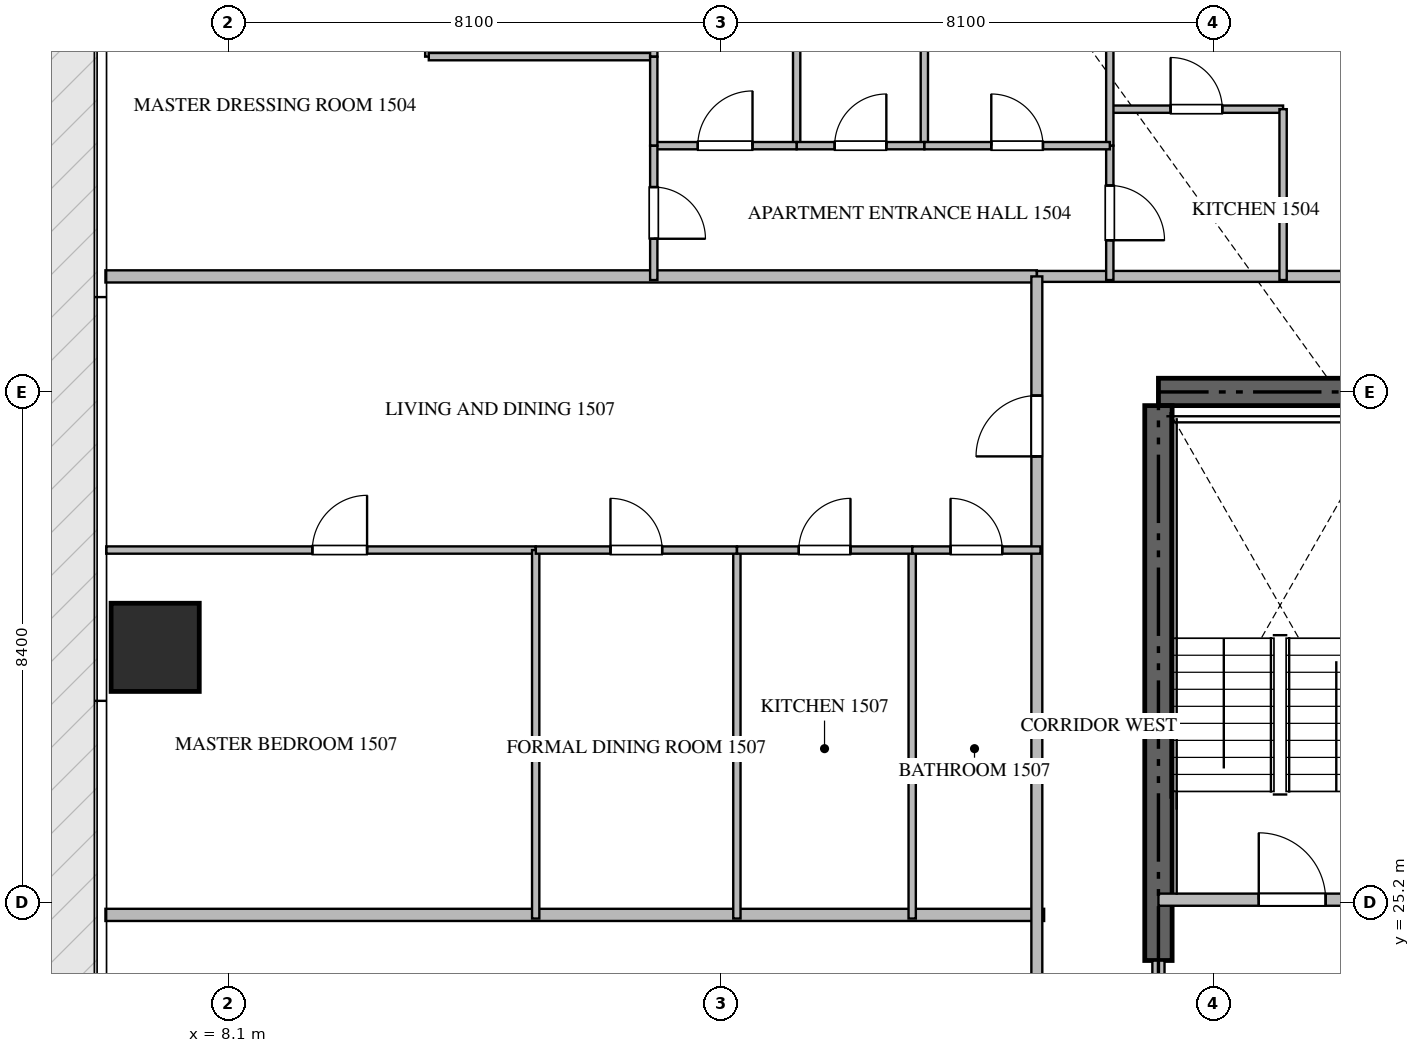
"""IFC4 building model, lengths in metres.
Left out: names, types, materials, properties, quantities, classifications, styles, units other than length and angle.
Written with IfcOpenShell. Run it as: python <this file> out.ifc"""

import sys

from ifc_helpers import new_model, si_unit, direction, frame, frame_2d, origin, origin_2d, place, context, subcontext, project, spatial, rectangle, extrude, source, transform, mapped, element, fill, save


model = new_model("IFC4")
c1 = context("Model", 3, precision=1e-05, world=origin(), true_north=direction((0.0, 1.0)))
c2 = subcontext(c1, "Body", "Model", "MODEL_VIEW")
j1 = project(units=[si_unit("LENGTHUNIT", "METRE"), si_unit("PLANEANGLEUNIT", "RADIAN")], contexts=[c1])
p1 = place(None, origin())
s1 = spatial("IfcSite", under=j1, at=p1, CompositionType="ELEMENT")
p2 = place(p1, origin())
s2 = spatial("IfcBuilding", under=s1, at=p2, CompositionType="ELEMENT")
p3 = place(p2, frame((0.0, 0.0, 64.2)))
s3 = spatial("IfcBuildingStorey", under=s2, at=p3, CompositionType="ELEMENT", Elevation=64.2)
p4 = place(p3, frame((41.4, 33.6, -0.26), z_axis=(0.0, 0.0, 1.0), x_axis=(-1.0, 0.0, 0.0)))
e1 = element("IfcWall", 1, at=p4, inside=s3, PredefinedType="SHEAR", context=c2, shape_type="SweptSolid", body=[
    extrude(rectangle(XDim=18.0, YDim=0.45, at=frame_2d((9.0, 0.0))), origin(), (0.0, 0.0, 1.0), 3.748),
])
p5 = place(p3, frame((23.4, 24.25, -0.26), z_axis=(0.0, 0.0, 1.0), x_axis=(0.0, 1.0, 0.0)))
e2 = element("IfcWall", 2, at=p5, inside=s3, PredefinedType="SHEAR", context=c2, shape_type="SweptSolid", body=[
    extrude(rectangle(XDim=9.125, YDim=0.45, at=frame_2d((4.562, 0.0))), origin(), (0.0, 0.0, 1.0), 3.748),
])
m1 = source(origin(), c2, "Body", "SweptSolid", [
    extrude(rectangle(XDim=1.45, YDim=1.45, at=origin_2d()), origin(), (0.0, 0.0, 1.0), 3.75),
])
p6 = place(p3, frame((6.9, 29.4, -0.26), z_axis=(0.0, 0.0, 1.0), x_axis=(1.0, 0.0, 0.0)))
e3 = element("IfcColumn", 3, at=p6, inside=s3, PredefinedType="COLUMN", context=c2, shape_type="MappedRepresentation", body=[
    mapped(m1, transform((0.0, 0.0, 0.0), scale=1.0)),
])
p7 = place(p3, frame((23.4, 25.25, 0.0), z_axis=(0.0, 0.0, 1.0), x_axis=(1.0, 0.0, 0.0)))
e4 = element("IfcWall", 4, at=p7, inside=s3, PredefinedType="STANDARD", context=c2, shape_type="SweptSolid", body=[
    extrude(rectangle(XDim=4.45, YDim=0.2, at=frame_2d((2.225, 0.0))), origin(), (0.0, 0.0, 1.0), 3.49),
])
p8 = place(p7, frame((1.65, 0.0, 0.0)))
e5 = element("IfcOpeningElement", 5, at=p8, cuts=e4, PredefinedType="OPENING", context=c2, shape_type="SweptSolid", body=[
    extrude(rectangle(XDim=1.1, YDim=2.15, at=frame_2d((0.55, 1.075))), frame((0.0, 0.11, 0.0), z_axis=(0.0, -1.0, 0.0), x_axis=(1.0, 0.0, 0.0)), (0.0, 0.0, 1.0), 0.22),
])
p9 = place(p3, frame((23.4, 21.852, 0.0), z_axis=(0.0, 0.0, 1.0), x_axis=(0.0, 1.0, 0.0)))
e6 = element("IfcWall", 6, at=p9, inside=s3, PredefinedType="STANDARD", context=c2, shape_type="SweptSolid", body=[
    extrude(rectangle(XDim=2.396, YDim=0.2, at=frame_2d((1.198, 0.0))), origin(), (0.0, 0.0, 1.0), 3.49),
])
p10 = place(p9, frame((0.648, 0.0, 0.0)))
e7 = element("IfcOpeningElement", 7, at=p10, cuts=e6, PredefinedType="OPENING", context=c2, shape_type="SweptSolid", body=[
    extrude(rectangle(XDim=1.1, YDim=2.15, at=frame_2d((0.55, 1.075))), frame((0.0, 0.11, 0.0), z_axis=(0.0, -1.0, 0.0), x_axis=(1.0, 0.0, 0.0)), (0.0, 0.0, 1.0), 0.22),
])
p11 = place(p3, frame((6.082, 25.0, 0.0), z_axis=(0.0, 0.0, 1.0), x_axis=(1.0, 0.0, 0.0)))
e8 = element("IfcWall", 8, at=p11, inside=s3, PredefinedType="PARTITIONING", context=c2, shape_type="SweptSolid", body=[
    extrude(rectangle(XDim=15.438, YDim=0.2, at=frame_2d((7.719, 0.0))), origin(), (0.0, 0.0, 1.0), 3.49),
])
p12 = place(p3, frame((6.082, 35.5, 0.0), z_axis=(0.0, 0.0, 1.0), x_axis=(1.0, 0.0, 0.0)))
e9 = element("IfcWall", 9, at=p12, inside=s3, PredefinedType="PARTITIONING", context=c2, shape_type="SweptSolid", body=[
    extrude(rectangle(XDim=15.318, YDim=0.2, at=frame_2d((7.659, 0.0))), origin(), (0.0, 0.0, 1.0), 3.49),
])
p13 = place(p3, frame((21.402, 35.5, 0.0), z_axis=(0.0, 0.0, 1.0), x_axis=(1.0, 0.0, 0.0)))
e10 = element("IfcWall", 10, at=p13, inside=s3, PredefinedType="PARTITIONING", context=c2, shape_type="SweptSolid", body=[
    extrude(rectangle(XDim=21.996, YDim=0.18, at=frame_2d((10.998, 0.0))), origin(), (0.0, 0.0, 1.0), 3.49),
])
p14 = place(p13, frame((6.425, 0.0, 0.0)))
e11 = element("IfcOpeningElement", 11, at=p14, cuts=e10, PredefinedType="OPENING", context=c2, shape_type="SweptSolid", body=[
    extrude(rectangle(XDim=1.0, YDim=2.15, at=frame_2d((0.5, 1.075))), frame((0.0, 0.1, 0.0), z_axis=(0.0, -1.0, 0.0), x_axis=(1.0, 0.0, 0.0)), (0.0, 0.0, 1.0), 0.2),
])
p15 = place(p13, frame((13.605, 0.0, 0.0)))
e12 = element("IfcOpeningElement", 12, at=p15, cuts=e10, PredefinedType="OPENING", context=c2, shape_type="SweptSolid", body=[
    extrude(rectangle(XDim=1.0, YDim=2.15, at=frame_2d((0.5, 1.075))), frame((0.0, 0.1, 0.0), z_axis=(0.0, -1.0, 0.0), x_axis=(1.0, 0.0, 0.0)), (0.0, 0.0, 1.0), 0.2),
])
p16 = place(p3, frame((21.4, 14.9, 0.0), z_axis=(0.0, 0.0, 1.0), x_axis=(0.0, 1.0, 0.0)))
e13 = element("IfcWall", 13, at=p16, inside=s3, PredefinedType="PARTITIONING", context=c2, shape_type="SweptSolid", body=[
    extrude(rectangle(XDim=20.6, YDim=0.18, at=frame_2d((10.3, 0.0))), origin(), (0.0, 0.0, 1.0), 3.49),
])
p17 = place(p16, frame((5.919, 0.0, 0.0)))
e14 = element("IfcOpeningElement", 14, at=p17, cuts=e13, PredefinedType="OPENING", context=c2, shape_type="SweptSolid", body=[
    extrude(rectangle(XDim=1.0, YDim=2.15, at=frame_2d((0.5, 1.075))), frame((0.0, 0.1, 0.0), z_axis=(0.0, -1.0, 0.0), x_axis=(1.0, 0.0, 0.0)), (0.0, 0.0, 1.0), 0.2),
])
p18 = place(p16, frame((17.64, 0.0, 0.0)))
e15 = element("IfcOpeningElement", 15, at=p18, cuts=e13, PredefinedType="OPENING", context=c2, shape_type="SweptSolid", body=[
    extrude(rectangle(XDim=1.0, YDim=2.15, at=frame_2d((0.5, 1.075))), frame((0.0, 0.1, 0.0), z_axis=(0.0, -1.0, 0.0), x_axis=(1.0, 0.0, 0.0)), (0.0, 0.0, 1.0), 0.2),
])
p19 = place(p3, frame((22.6, 38.25, 0.0), z_axis=(0.0, 0.0, 1.0), x_axis=(1.0, 0.0, 0.0)))
e16 = element("IfcWall", 16, at=p19, inside=s3, PredefinedType="PARTITIONING", context=c2, shape_type="SweptSolid", body=[
    extrude(rectangle(XDim=2.85, YDim=0.12, at=frame_2d((1.425, 0.0))), origin(), (0.0, 0.0, 1.0), 3.49),
])
p20 = place(p19, frame((1.0, 0.0, 0.0)))
e17 = element("IfcOpeningElement", 17, at=p20, cuts=e16, PredefinedType="OPENING", context=c2, shape_type="SweptSolid", body=[
    extrude(rectangle(XDim=0.85, YDim=2.1, at=frame_2d((0.425, 1.05))), frame((0.0, 0.07, 0.0), z_axis=(0.0, -1.0, 0.0), x_axis=(1.0, 0.0, 0.0)), (0.0, 0.0, 1.0), 0.14),
])
p21 = place(p3, frame((25.45, 38.25, 0.0), z_axis=(0.0, 0.0, 1.0), x_axis=(0.0, -1.0, 0.0)))
e18 = element("IfcWall", 18, at=p21, inside=s3, PredefinedType="PARTITIONING", context=c2, shape_type="SweptSolid", body=[
    extrude(rectangle(XDim=2.81, YDim=0.12, at=frame_2d((1.405, 0.0))), origin(), (0.0, 0.0, 1.0), 3.49),
])
p22 = place(p3, frame((22.6, 37.65, 0.0), z_axis=(0.0, 0.0, 1.0), x_axis=(0.0, -1.0, 0.0)))
e19 = element("IfcWall", 19, at=p22, inside=s3, PredefinedType="PARTITIONING", context=c2, shape_type="SweptSolid", body=[
    extrude(rectangle(XDim=2.21, YDim=0.12, at=frame_2d((1.105, 0.0))), origin(), (0.0, 0.0, 1.0), 3.49),
])
p23 = place(p22, frame((0.655, 0.0, 0.0)))
e20 = element("IfcOpeningElement", 20, at=p23, cuts=e19, PredefinedType="OPENING", context=c2, shape_type="SweptSolid", body=[
    extrude(rectangle(XDim=0.9, YDim=2.1, at=frame_2d((0.45, 1.05))), frame((0.0, 0.07, 0.0), z_axis=(0.0, -1.0, 0.0), x_axis=(1.0, 0.0, 0.0)), (0.0, 0.0, 1.0), 0.14),
])
p24 = place(p3, frame((22.6, 43.538, 0.0), z_axis=(0.0, 0.0, 1.0), x_axis=(0.0, -1.0, 0.0)))
e21 = element("IfcWall", 21, at=p24, inside=s3, PredefinedType="PARTITIONING", context=c2, shape_type="SweptSolid", body=[
    extrude(rectangle(XDim=5.886, YDim=0.12, at=frame_2d((2.943, 0.0))), origin(), (0.0, 0.0, 1.0), 3.49),
])
p25 = place(p3, frame((17.45, 50.105, 0.0), z_axis=(0.0, 0.0, 1.0), x_axis=(0.0, -1.0, 0.0)))
e22 = element("IfcWall", 22, at=p25, inside=s3, PredefinedType="PARTITIONING", context=c2, shape_type="SweptSolid", body=[
    extrude(rectangle(XDim=12.455, YDim=0.12, at=frame_2d((6.228, 0.0))), origin(), (0.0, 0.0, 1.0), 3.49),
])
p26 = place(p3, frame((19.55, 43.54, 0.0), z_axis=(0.0, 0.0, 1.0), x_axis=(0.0, -1.0, 0.0)))
e23 = element("IfcWall", 23, at=p26, inside=s3, PredefinedType="PARTITIONING", context=c2, shape_type="SweptSolid", body=[
    extrude(rectangle(XDim=5.89, YDim=0.12, at=frame_2d((2.945, 0.0))), origin(), (0.0, 0.0, 1.0), 3.49),
])
p27 = place(p3, frame((17.45, 37.65, 0.0), z_axis=(0.0, 0.0, 1.0), x_axis=(1.0, 0.0, 0.0)))
e24 = element("IfcWall", 24, at=p27, inside=s3, PredefinedType="PARTITIONING", context=c2, shape_type="SweptSolid", body=[
    extrude(rectangle(XDim=2.1, YDim=0.12, at=frame_2d((1.05, 0.0))), origin(), (0.0, 0.0, 1.0), 3.49),
])
p28 = place(p27, frame((0.625, 0.0, 0.0)))
e25 = element("IfcOpeningElement", 25, at=p28, cuts=e24, PredefinedType="OPENING", context=c2, shape_type="SweptSolid", body=[
    extrude(rectangle(XDim=0.85, YDim=2.1, at=frame_2d((0.425, 1.05))), frame((0.0, 0.07, 0.0), z_axis=(0.0, -1.0, 0.0), x_axis=(1.0, 0.0, 0.0)), (0.0, 0.0, 1.0), 0.14),
])
p29 = place(p3, frame((19.552, 37.65, 0.0), z_axis=(0.0, 0.0, 1.0), x_axis=(1.0, 0.0, 0.0)))
e26 = element("IfcWall", 26, at=p29, inside=s3, PredefinedType="PARTITIONING", context=c2, shape_type="SweptSolid", body=[
    extrude(rectangle(XDim=3.048, YDim=0.12, at=frame_2d((1.524, 0.0))), origin(), (0.0, 0.0, 1.0), 3.49),
])
p30 = place(p29, frame((1.099, 0.0, 0.0)))
e27 = element("IfcOpeningElement", 27, at=p30, cuts=e26, PredefinedType="OPENING", context=c2, shape_type="SweptSolid", body=[
    extrude(rectangle(XDim=0.85, YDim=2.1, at=frame_2d((0.425, 1.05))), frame((0.0, 0.07, 0.0), z_axis=(0.0, -1.0, 0.0), x_axis=(1.0, 0.0, 0.0)), (0.0, 0.0, 1.0), 0.14),
])
p31 = place(p3, frame((15.1, 37.65, 0.0), z_axis=(0.0, 0.0, 1.0), x_axis=(1.0, 0.0, 0.0)))
e28 = element("IfcWall", 28, at=p31, inside=s3, PredefinedType="PARTITIONING", context=c2, shape_type="SweptSolid", body=[
    extrude(rectangle(XDim=2.348, YDim=0.12, at=frame_2d((1.174, 0.0))), origin(), (0.0, 0.0, 1.0), 3.49),
])
p32 = place(p31, frame((0.724, 0.0, 0.0)))
e29 = element("IfcOpeningElement", 29, at=p32, cuts=e28, PredefinedType="OPENING", context=c2, shape_type="SweptSolid", body=[
    extrude(rectangle(XDim=0.9, YDim=2.1, at=frame_2d((0.45, 1.05))), frame((0.0, 0.07, 0.0), z_axis=(0.0, -1.0, 0.0), x_axis=(1.0, 0.0, 0.0)), (0.0, 0.0, 1.0), 0.14),
])
p33 = place(p3, frame((11.4, 45.905, 0.0), z_axis=(0.0, 0.0, 1.0), x_axis=(0.0, -1.0, 0.0)))
e30 = element("IfcWall", 30, at=p33, inside=s3, PredefinedType="PARTITIONING", context=c2, shape_type="SweptSolid", body=[
    extrude(rectangle(XDim=6.791, YDim=0.12, at=frame_2d((3.396, 0.0))), origin(), (0.0, 0.0, 1.0), 3.49),
])
p34 = place(p3, frame((11.4, 39.114, 0.0), z_axis=(0.0, 0.0, 1.0), x_axis=(1.0, 0.0, 0.0)))
e31 = element("IfcWall", 31, at=p34, inside=s3, PredefinedType="PARTITIONING", context=c2, shape_type="SweptSolid", body=[
    extrude(rectangle(XDim=3.7, YDim=0.12, at=frame_2d((1.85, 0.0))), origin(), (0.0, 0.0, 1.0), 3.49),
])
p35 = place(p3, frame((15.1, 42.898, 0.0), z_axis=(0.0, 0.0, 1.0), x_axis=(0.0, -1.0, 0.0)))
e32 = element("IfcWall", 32, at=p35, inside=s3, PredefinedType="PARTITIONING", context=c2, shape_type="SweptSolid", body=[
    extrude(rectangle(XDim=3.784, YDim=0.12, at=frame_2d((1.892, 0.0))), origin(), (0.0, 0.0, 1.0), 2.922),
])
p36 = place(p35, frame((1.467, 0.0, 0.0)))
e33 = element("IfcOpeningElement", 33, at=p36, cuts=e32, PredefinedType="OPENING", context=c2, shape_type="SweptSolid", body=[
    extrude(rectangle(XDim=0.85, YDim=2.1, at=frame_2d((0.425, 1.05))), frame((0.0, 0.07, 0.0), z_axis=(0.0, -1.0, 0.0), x_axis=(1.0, 0.0, 0.0)), (0.0, 0.0, 1.0), 0.14),
])
p37 = place(p3, frame((15.1, 39.112, 0.0), z_axis=(0.0, 0.0, 1.0), x_axis=(0.0, -1.0, 0.0)))
e34 = element("IfcWall", 34, at=p37, inside=s3, PredefinedType="PARTITIONING", context=c2, shape_type="SweptSolid", body=[
    extrude(rectangle(XDim=1.462, YDim=0.12, at=frame_2d((0.731, 0.0))), origin(), (0.0, 0.0, 1.0), 2.922),
])
p38 = place(p3, frame((15.1, 37.648, 0.0), z_axis=(0.0, 0.0, 1.0), x_axis=(0.0, -1.0, 0.0)))
e35 = element("IfcWall", 35, at=p38, inside=s3, PredefinedType="PARTITIONING", context=c2, shape_type="SweptSolid", body=[
    extrude(rectangle(XDim=2.208, YDim=0.12, at=frame_2d((1.104, 0.0))), origin(), (0.0, 0.0, 1.0), 2.922),
])
p39 = place(p38, frame((0.679, 0.0, 0.0)))
e36 = element("IfcOpeningElement", 36, at=p39, cuts=e35, PredefinedType="OPENING", context=c2, shape_type="SweptSolid", body=[
    extrude(rectangle(XDim=0.85, YDim=2.1, at=frame_2d((0.425, 1.05))), frame((0.0, 0.07, 0.0), z_axis=(0.0, -1.0, 0.0), x_axis=(1.0, 0.0, 0.0)), (0.0, 0.0, 1.0), 0.14),
])
p40 = place(p3, frame((6.095, 31.0, 0.0), z_axis=(0.0, 0.0, 1.0), x_axis=(1.0, 0.0, 0.0)))
e37 = element("IfcWall", 37, at=p40, inside=s3, PredefinedType="PARTITIONING", context=c2, shape_type="SweptSolid", body=[
    extrude(rectangle(XDim=7.063, YDim=0.12, at=frame_2d((3.531, 0.0))), origin(), (0.0, 0.0, 1.0), 3.49),
])
p41 = place(p40, frame((3.39, 0.0, 0.0)))
e38 = element("IfcOpeningElement", 38, at=p41, cuts=e37, PredefinedType="OPENING", context=c2, shape_type="SweptSolid", body=[
    extrude(rectangle(XDim=0.9, YDim=2.1, at=frame_2d((0.45, 1.05))), frame((0.0, 0.07, 0.0), z_axis=(0.0, -1.0, 0.0), x_axis=(1.0, 0.0, 0.0)), (0.0, 0.0, 1.0), 0.14),
])
for number, where, z_axis, x_axis in (
    (39, (13.158, 24.94, 0.0), (0.0, 0.0, 1.0), (0.0, 1.0, 0.0)),
    (40, (16.467, 24.94, 0.0), (0.0, 0.0, 1.0), (0.0, 1.0, 0.0)),
    (41, (19.35, 24.94, 0.0), (0.0, 0.0, 1.0), (0.0, 1.0, 0.0)),
):
    element("IfcWall", number, at=place(p3, frame(where, z_axis=z_axis, x_axis=x_axis)), inside=s3, PredefinedType="PARTITIONING", context=c2, shape_type="SweptSolid", body=[
        extrude(rectangle(XDim=6.06, YDim=0.12, at=frame_2d((3.03, 0.0))), origin(), (0.0, 0.0, 1.0), 3.49),
    ])
p42 = place(p3, frame((13.16, 31.0, 0.0), z_axis=(0.0, 0.0, 1.0), x_axis=(1.0, 0.0, 0.0)))
e42 = element("IfcWall", 42, at=p42, inside=s3, PredefinedType="PARTITIONING", context=c2, shape_type="SweptSolid", body=[
    extrude(rectangle(XDim=3.307, YDim=0.12, at=frame_2d((1.654, 0.0))), origin(), (0.0, 0.0, 1.0), 3.49),
])
p43 = place(p42, frame((1.228, 0.0, 0.0)))
e43 = element("IfcOpeningElement", 43, at=p43, cuts=e42, PredefinedType="OPENING", context=c2, shape_type="SweptSolid", body=[
    extrude(rectangle(XDim=0.85, YDim=2.1, at=frame_2d((0.425, 1.05))), frame((0.0, 0.07, 0.0), z_axis=(0.0, -1.0, 0.0), x_axis=(1.0, 0.0, 0.0)), (0.0, 0.0, 1.0), 0.14),
])
p44 = place(p3, frame((16.469, 31.0, 0.0), z_axis=(0.0, 0.0, 1.0), x_axis=(1.0, 0.0, 0.0)))
e44 = element("IfcWall", 44, at=p44, inside=s3, PredefinedType="PARTITIONING", context=c2, shape_type="SweptSolid", body=[
    extrude(rectangle(XDim=2.881, YDim=0.12, at=frame_2d((1.44, 0.0))), origin(), (0.0, 0.0, 1.0), 3.49),
])
p45 = place(p44, frame((1.016, 0.0, 0.0)))
e45 = element("IfcOpeningElement", 45, at=p45, cuts=e44, PredefinedType="OPENING", context=c2, shape_type="SweptSolid", body=[
    extrude(rectangle(XDim=0.85, YDim=2.1, at=frame_2d((0.425, 1.05))), frame((0.0, 0.07, 0.0), z_axis=(0.0, -1.0, 0.0), x_axis=(1.0, 0.0, 0.0)), (0.0, 0.0, 1.0), 0.14),
])
p46 = place(p3, frame((19.352, 31.0, 0.0), z_axis=(0.0, 0.0, 1.0), x_axis=(1.0, 0.0, 0.0)))
e46 = element("IfcWall", 46, at=p46, inside=s3, PredefinedType="PARTITIONING", context=c2, shape_type="SweptSolid", body=[
    extrude(rectangle(XDim=2.108, YDim=0.12, at=frame_2d((1.054, 0.0))), origin(), (0.0, 0.0, 1.0), 3.49),
])
p47 = place(p46, frame((0.629, 0.0, 0.0)))
e47 = element("IfcOpeningElement", 47, at=p47, cuts=e46, PredefinedType="OPENING", context=c2, shape_type="SweptSolid", body=[
    extrude(rectangle(XDim=0.85, YDim=2.1, at=frame_2d((0.425, 1.05))), frame((0.0, 0.07, 0.0), z_axis=(0.0, -1.0, 0.0), x_axis=(1.0, 0.0, 0.0)), (0.0, 0.0, 1.0), 0.14),
])
m2 = source(origin(), c2, "Body", "SweptSolid", [
    extrude(rectangle(XDim=1.1, YDim=2.15, at=frame_2d((0.55, 1.075))), frame((0.0, 0.025, 0.0), z_axis=(0.0, -1.0, 0.0), x_axis=(1.0, 0.0, 0.0)), (0.0, 0.0, 1.0), 0.05),
])
p48 = place(p8, origin())
e48 = element("IfcDoor", 48, at=p48, inside=s3, OperationType="SINGLE_SWING_LEFT", PredefinedType="DOOR", context=c2, shape_type="MappedRepresentation", body=[
    mapped(m2, transform((0.0, 0.0, 0.0), scale=1.0)),
])
fill(e5, e48)
m3 = source(origin(), c2, "Body", "SweptSolid", [
    extrude(rectangle(XDim=1.0, YDim=2.15, at=frame_2d((0.5, 1.075))), frame((0.0, 0.025, 0.0), z_axis=(0.0, -1.0, 0.0), x_axis=(1.0, 0.0, 0.0)), (0.0, 0.0, 1.0), 0.05),
])
p49 = place(p18, origin())
e49 = element("IfcDoor", 49, at=p49, inside=s3, OperationType="SINGLE_SWING_LEFT", PredefinedType="DOOR", context=c2, shape_type="MappedRepresentation", body=[
    mapped(m3, transform((0.0, 0.0, 0.0), scale=1.0)),
])
fill(e15, e49)
m4 = source(origin(), c2, "Body", "SweptSolid", [
    extrude(rectangle(XDim=0.85, YDim=2.1, at=frame_2d((0.425, 1.05))), frame((0.0, 0.025, 0.0), z_axis=(0.0, -1.0, 0.0), x_axis=(1.0, 0.0, 0.0)), (0.0, 0.0, 1.0), 0.05),
])
p50 = place(p20, origin())
e50 = element("IfcDoor", 50, at=p50, inside=s3, OperationType="SINGLE_SWING_LEFT", PredefinedType="DOOR", context=c2, shape_type="MappedRepresentation", body=[
    mapped(m4, transform((0.0, 0.0, 0.0), scale=1.0)),
])
fill(e17, e50)
m5 = source(origin(), c2, "Body", "SweptSolid", [
    extrude(rectangle(XDim=0.9, YDim=2.1, at=frame_2d((0.45, 1.05))), frame((0.0, 0.025, 0.0), z_axis=(0.0, -1.0, 0.0), x_axis=(1.0, 0.0, 0.0)), (0.0, 0.0, 1.0), 0.05),
])
p51 = place(p23, origin())
e51 = element("IfcDoor", 51, at=p51, inside=s3, OperationType="SINGLE_SWING_RIGHT", PredefinedType="DOOR", context=c2, shape_type="MappedRepresentation", body=[
    mapped(m5, transform((0.0, 0.0, 0.0), scale=1.0)),
])
fill(e20, e51)
p52 = place(p28, origin())
e52 = element("IfcDoor", 52, at=p52, inside=s3, OperationType="SINGLE_SWING_RIGHT", PredefinedType="DOOR", context=c2, shape_type="MappedRepresentation", body=[
    mapped(m4, transform((0.0, 0.0, 0.0), scale=1.0)),
])
fill(e25, e52)
p53 = place(p30, origin())
e53 = element("IfcDoor", 53, at=p53, inside=s3, OperationType="SINGLE_SWING_LEFT", PredefinedType="DOOR", context=c2, shape_type="MappedRepresentation", body=[
    mapped(m4, transform((0.0, 0.0, 0.0), scale=1.0)),
])
fill(e27, e53)
p54 = place(p32, origin())
e54 = element("IfcDoor", 54, at=p54, inside=s3, OperationType="SINGLE_SWING_RIGHT", PredefinedType="DOOR", context=c2, shape_type="MappedRepresentation", body=[
    mapped(m5, transform((0.0, 0.0, 0.0), scale=1.0)),
])
fill(e29, e54)
p55 = place(p39, origin())
e55 = element("IfcDoor", 55, at=p55, inside=s3, OperationType="SINGLE_SWING_RIGHT", PredefinedType="DOOR", context=c2, shape_type="MappedRepresentation", body=[
    mapped(m4, transform((0.0, 0.0, 0.0), scale=1.0)),
])
fill(e36, e55)
p56 = place(p41, origin())
e56 = element("IfcDoor", 56, at=p56, inside=s3, OperationType="SINGLE_SWING_RIGHT", PredefinedType="DOOR", context=c2, shape_type="MappedRepresentation", body=[
    mapped(m5, transform((0.0, 0.0, 0.0), scale=1.0)),
])
fill(e38, e56)
p57 = place(p43, origin())
e57 = element("IfcDoor", 57, at=p57, inside=s3, OperationType="SINGLE_SWING_LEFT", PredefinedType="DOOR", context=c2, shape_type="MappedRepresentation", body=[
    mapped(m4, transform((0.0, 0.0, 0.0), scale=1.0)),
])
fill(e43, e57)
p58 = place(p45, origin())
e58 = element("IfcDoor", 58, at=p58, inside=s3, OperationType="SINGLE_SWING_RIGHT", PredefinedType="DOOR", context=c2, shape_type="MappedRepresentation", body=[
    mapped(m4, transform((0.0, 0.0, 0.0), scale=1.0)),
])
fill(e45, e58)
p59 = place(p47, origin())
e59 = element("IfcDoor", 59, at=p59, inside=s3, OperationType="SINGLE_SWING_LEFT", PredefinedType="DOOR", context=c2, shape_type="MappedRepresentation", body=[
    mapped(m4, transform((0.0, 0.0, 0.0), scale=1.0)),
])
fill(e47, e59)
save(model, sys.argv[1])
